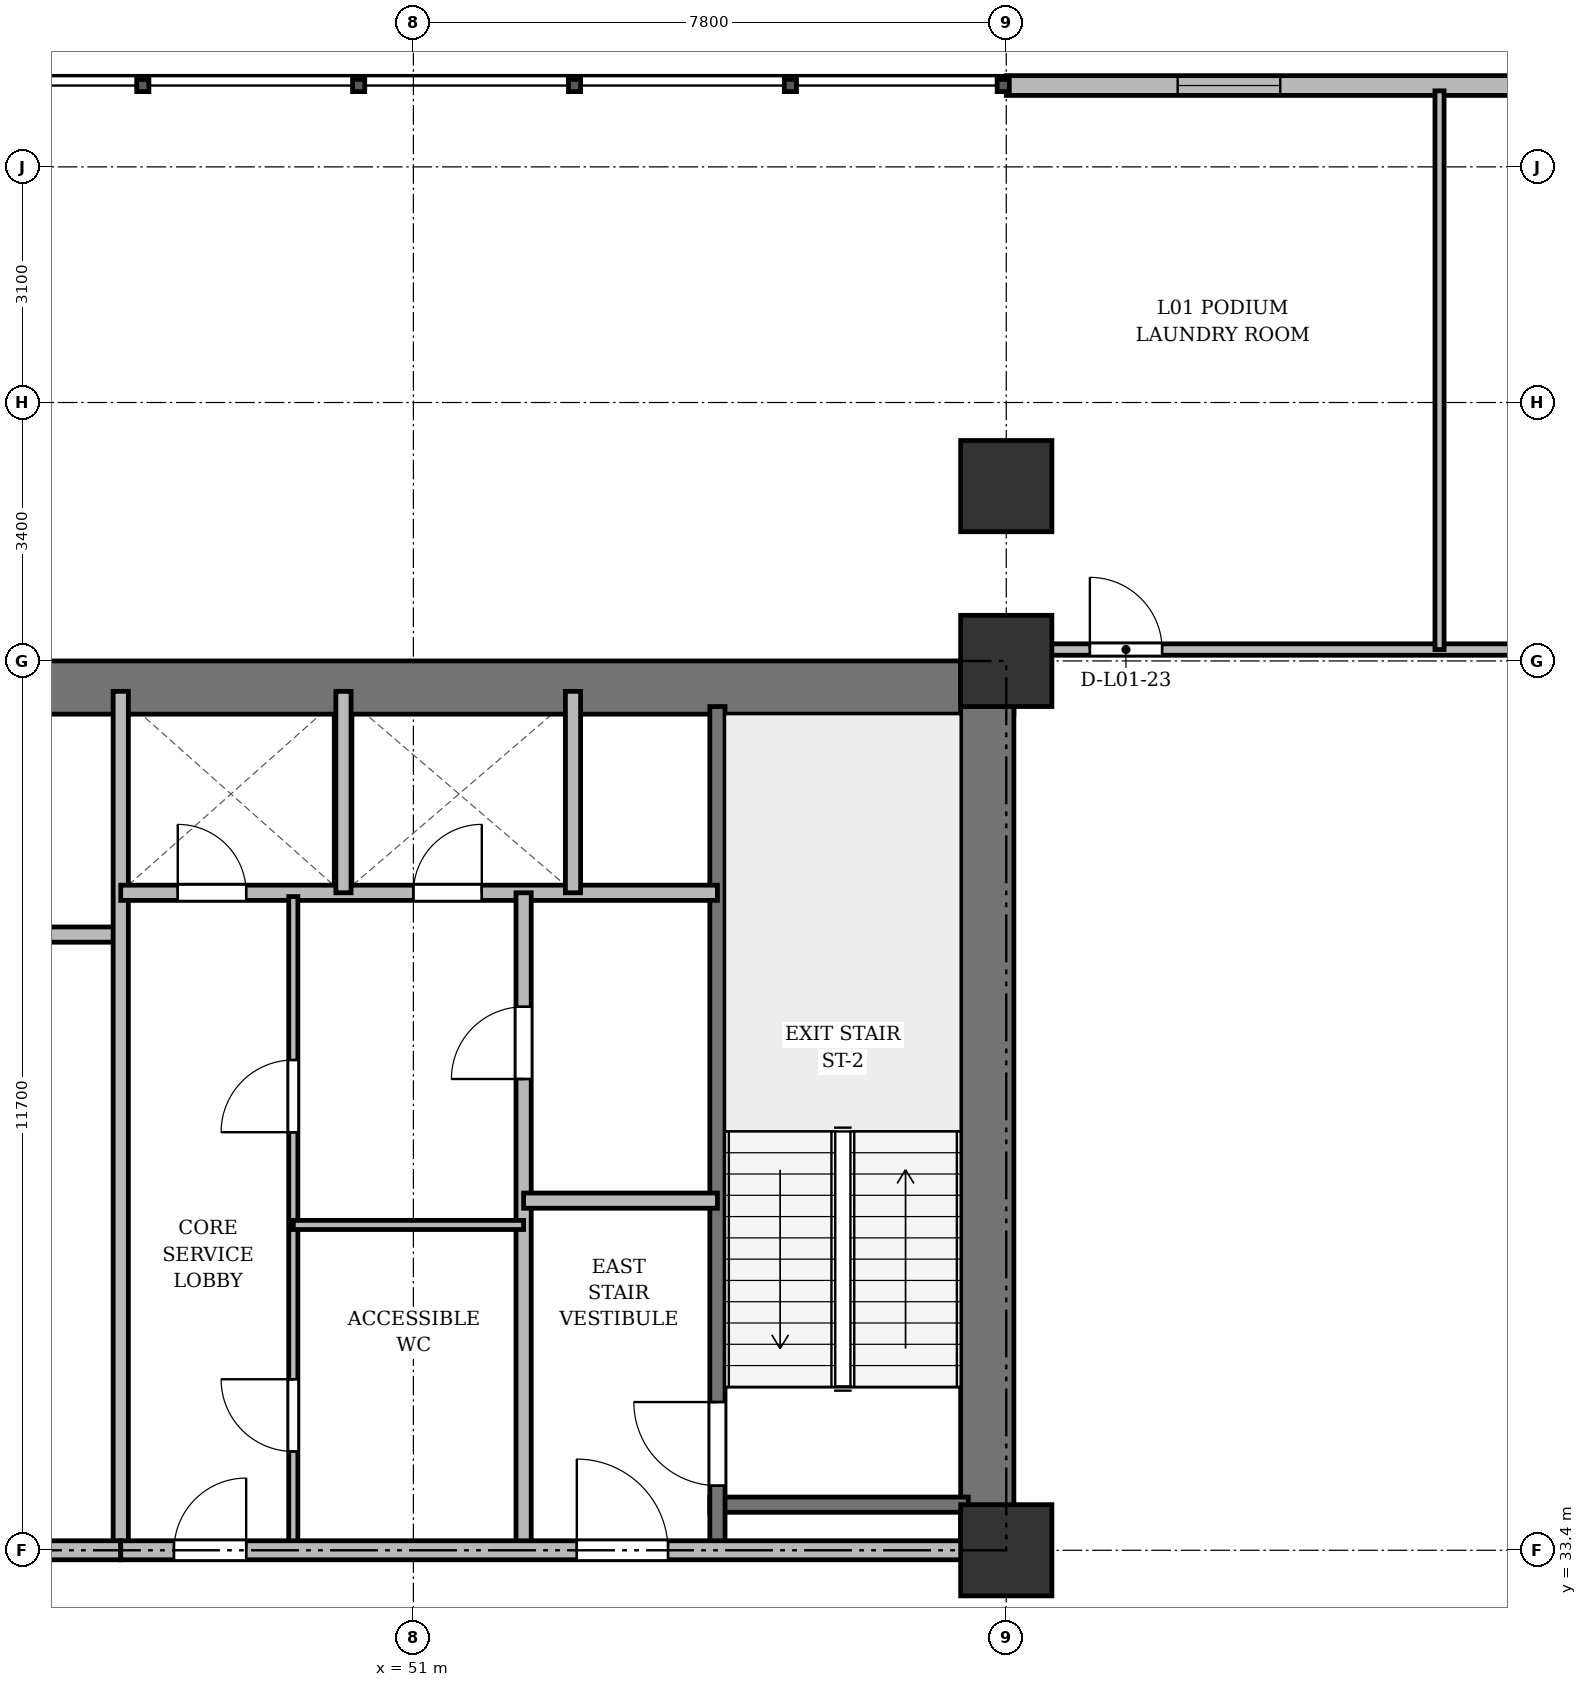
"""IFC4 building model, lengths in metres.
Left out: names, types, materials, properties, quantities, classifications, styles, units other than length and angle.
Written with IfcOpenShell. Run it as: python <this file> out.ifc"""

import sys

from ifc_helpers import new_model, si_unit, direction, frame, frame_2d, origin, origin_2d, place, context, subcontext, project, spatial, rectangle, extrude, source, transform, mapped, element, fill, save


model = new_model("IFC4")
c1 = context("Model", 3, precision=1e-05, world=origin(), true_north=direction((0.0, 1.0)))
c2 = subcontext(c1, "Body", "Model", "MODEL_VIEW")
j1 = project(units=[si_unit("LENGTHUNIT", "METRE"), si_unit("PLANEANGLEUNIT", "RADIAN")], contexts=[c1])
p1 = place(None, origin())
s1 = spatial("IfcSite", under=j1, at=p1, CompositionType="ELEMENT")
p2 = place(p1, origin())
s2 = spatial("IfcBuilding", under=s1, at=p2, CompositionType="ELEMENT")
p3 = place(p2, frame((0.0, 0.0, 5.2)))
s3 = spatial("IfcBuildingStorey", under=s2, at=p3, CompositionType="ELEMENT", Elevation=5.2)
m1 = source(origin(), c2, "Body", "SweptSolid", [
    extrude(rectangle(XDim=1.2, YDim=1.2, at=origin_2d()), origin(), (0.0, 0.0, 1.0), 4.5),
])
for number, where, z_axis, x_axis in (
    (1, (58.8, 33.4, 0.0), (0.0, 0.0, 1.0), (1.0, 0.0, 0.0)),
    (2, (58.8, 45.1, 0.0), (0.0, 0.0, 1.0), (1.0, 0.0, 0.0)),
    (3, (58.8, 47.4, 0.0), (0.0, 0.0, 1.0), (1.0, 0.0, 0.0)),
):
    element("IfcColumn", number, at=place(p3, frame(where, z_axis=z_axis, x_axis=x_axis)), inside=s3, PredefinedType="COLUMN", context=c2, shape_type="MappedRepresentation", body=[
        mapped(m1, transform((0.0, 0.0, 0.0), x_axis=(1.0, 0.0, 0.0), y_axis=(0.0, 1.0, 0.0), z_axis=(0.0, 0.0, 1.0), scale=1.0)),
    ])
p4 = place(p3, frame((58.8, 52.67, 0.0), z_axis=(0.0, 0.0, 1.0), x_axis=(1.0, 0.0, 0.0)))
e4 = element("IfcWall", 4, at=p4, inside=s3, PredefinedType="SOLIDWALL", context=c2, shape_type="SweptSolid", body=[
    extrude(rectangle(XDim=18.65, YDim=0.26, at=frame_2d((9.325, 0.0))), origin(), (0.0, 0.0, 1.0), 4.2),
])
p5 = place(p4, frame((2.255, 0.0, 0.9)))
e5 = element("IfcOpeningElement", 5, at=p5, cuts=e4, PredefinedType="OPENING", context=c2, shape_type="SweptSolid", body=[
    extrude(rectangle(XDim=1.35, YDim=1.5, at=frame_2d((0.675, 0.75))), frame((0.0, 0.14, 0.0), z_axis=(0.0, -1.0, 0.0), x_axis=(1.0, 0.0, 0.0)), (0.0, 0.0, 1.0), 0.28),
])
p6 = place(p4, frame((11.51, 0.0, 0.9)))
e6 = element("IfcOpeningElement", 6, at=p6, cuts=e4, PredefinedType="OPENING", context=c2, shape_type="SweptSolid", body=[
    extrude(rectangle(XDim=1.35, YDim=1.5, at=frame_2d((0.675, 0.75))), frame((0.0, 0.14, 0.0), z_axis=(0.0, -1.0, 0.0), x_axis=(1.0, 0.0, 0.0)), (0.0, 0.0, 1.0), 0.28),
])
p7 = place(p3, frame((15.5, 44.75, 0.0), z_axis=(0.0, 0.0, 1.0), x_axis=(1.0, 0.0, 0.0)))
e7 = element("IfcWall", 7, at=p7, inside=s3, PredefinedType="SHEAR", context=c2, shape_type="SweptSolid", body=[
    extrude(rectangle(XDim=43.4, YDim=0.7, at=frame_2d((21.7, 0.0))), origin(), (0.0, 0.0, 1.0), 4.2),
])
p8 = place(p3, frame((58.55, 33.4, 0.0), z_axis=(0.0, 0.0, 1.0), x_axis=(0.0, 1.0, 0.0)))
e8 = element("IfcWall", 8, at=p8, inside=s3, PredefinedType="SHEAR", context=c2, shape_type="SweptSolid", body=[
    extrude(rectangle(XDim=11.7, YDim=0.7, at=frame_2d((5.85, 0.0))), origin(), (0.0, 0.0, 1.0), 4.2),
])
p9 = place(p3, frame((54.9, 34.0, 0.0), z_axis=(0.0, 0.0, 1.0), x_axis=(1.0, 0.0, 0.0)))
e9 = element("IfcWall", 9, at=p9, inside=s3, PredefinedType="SHEAR", context=c2, shape_type="SweptSolid", body=[
    extrude(rectangle(XDim=3.4, YDim=0.2, at=frame_2d((1.7, 0.0))), origin(), (0.0, 0.0, 1.0), 4.2),
])
p10 = place(p3, frame((55.0, 33.4, 0.0), z_axis=(0.0, 0.0, 1.0), x_axis=(0.0, 1.0, 0.0)))
e10 = element("IfcWall", 10, at=p10, inside=s3, PredefinedType="SHEAR", context=c2, shape_type="SweptSolid", body=[
    extrude(rectangle(XDim=11.1, YDim=0.2, at=frame_2d((5.55, 0.0))), origin(), (0.0, 0.0, 1.0), 4.2),
])
p11 = place(p10, frame((0.85, 0.0, 0.0)))
e11 = element("IfcOpeningElement", 11, at=p11, cuts=e10, PredefinedType="OPENING", context=c2, shape_type="SweptSolid", body=[
    extrude(rectangle(XDim=1.1, YDim=2.15, at=frame_2d((0.55, 1.075))), frame((0.0, 0.11, 0.0), z_axis=(0.0, -1.0, 0.0), x_axis=(1.0, 0.0, 0.0)), (0.0, 0.0, 1.0), 0.22),
])
p12 = place(p3, frame((40.25, 41.5, 0.0), z_axis=(0.0, 0.0, 1.0), x_axis=(1.0, 0.0, 0.0)))
e12 = element("IfcWall", 12, at=p12, inside=s3, PredefinedType="SOLIDWALL", context=c2, shape_type="SweptSolid", body=[
    extrude(rectangle(XDim=6.9, YDim=0.2, at=frame_2d((3.45, 0.0))), origin(), (0.0, 0.0, 1.0), 3.4),
])
p13 = place(p3, frame((47.15, 33.4, 0.0), z_axis=(0.0, 0.0, 1.0), x_axis=(0.0, 1.0, 0.0)))
e13 = element("IfcWall", 13, at=p13, inside=s3, PredefinedType="SOLIDWALL", context=c2, shape_type="SweptSolid", body=[
    extrude(rectangle(XDim=11.3, YDim=0.2, at=frame_2d((5.65, 0.0))), origin(), (0.0, 0.0, 1.0), 3.1),
])
p14 = place(p3, frame((26.3, 33.4, 0.0), z_axis=(0.0, 0.0, 1.0), x_axis=(1.0, 0.0, 0.0)))
e14 = element("IfcWall", 14, at=p14, inside=s3, PredefinedType="PARTITIONING", context=c2, shape_type="SweptSolid", body=[
    extrude(rectangle(XDim=20.85, YDim=0.25, at=frame_2d((10.425, 0.0))), origin(), (0.0, 0.0, 1.0), 3.1),
])
p15 = place(p14, frame((9.2, 0.0, 0.0)))
e15 = element("IfcOpeningElement", 15, at=p15, cuts=e14, PredefinedType="OPENING", context=c2, shape_type="SweptSolid", body=[
    extrude(rectangle(XDim=1.6, YDim=2.2, at=frame_2d((0.8, 1.1))), frame((0.0, 0.135, 0.0), z_axis=(0.0, -1.0, 0.0), x_axis=(1.0, 0.0, 0.0)), (0.0, 0.0, 1.0), 0.27),
])
p16 = place(p3, frame((47.15, 42.05, 0.0), z_axis=(0.0, 0.0, 1.0), x_axis=(1.0, 0.0, 0.0)))
e16 = element("IfcWall", 16, at=p16, inside=s3, PredefinedType="SOLIDWALL", context=c2, shape_type="SweptSolid", body=[
    extrude(rectangle(XDim=7.85, YDim=0.2, at=frame_2d((3.925, 0.0))), origin(), (0.0, 0.0, 1.0), 4.2),
])
p17 = place(p16, frame((0.75, 0.0, 0.0)))
e17 = element("IfcOpeningElement", 17, at=p17, cuts=e16, PredefinedType="OPENING", context=c2, shape_type="SweptSolid", body=[
    extrude(rectangle(XDim=0.9, YDim=2.1, at=frame_2d((0.45, 1.05))), frame((0.0, 0.11, 0.0), z_axis=(0.0, -1.0, 0.0), x_axis=(1.0, 0.0, 0.0)), (0.0, 0.0, 1.0), 0.22),
])
p18 = place(p16, frame((3.85, 0.0, 0.0)))
e18 = element("IfcOpeningElement", 18, at=p18, cuts=e16, PredefinedType="OPENING", context=c2, shape_type="SweptSolid", body=[
    extrude(rectangle(XDim=0.9, YDim=2.1, at=frame_2d((0.45, 1.05))), frame((0.0, 0.11, 0.0), z_axis=(0.0, -1.0, 0.0), x_axis=(1.0, 0.0, 0.0)), (0.0, 0.0, 1.0), 0.22),
])
for number, where, z_axis, x_axis in (
    (19, (50.08, 42.05, 0.0), (0.0, 0.0, 1.0), (0.0, 1.0, 0.0)),
    (20, (53.1, 42.05, 0.0), (0.0, 0.0, 1.0), (0.0, 1.0, 0.0)),
):
    element("IfcWall", number, at=place(p3, frame(where, z_axis=z_axis, x_axis=x_axis)), inside=s3, PredefinedType="SOLIDWALL", context=c2, shape_type="SweptSolid", body=[
        extrude(rectangle(XDim=2.65, YDim=0.2, at=frame_2d((1.325, 0.0))), origin(), (0.0, 0.0, 1.0), 4.2),
    ])
p19 = place(p3, frame((52.45, 33.4, 0.0), z_axis=(0.0, 0.0, 1.0), x_axis=(0.0, 1.0, 0.0)))
e21 = element("IfcWall", 21, at=p19, inside=s3, PredefinedType="PARTITIONING", context=c2, shape_type="SweptSolid", body=[
    extrude(rectangle(XDim=8.65, YDim=0.2, at=frame_2d((4.325, 0.0))), origin(), (0.0, 0.0, 1.0), 3.1),
])
p20 = place(p19, frame((6.2, 0.0, 0.0)))
e22 = element("IfcOpeningElement", 22, at=p20, cuts=e21, PredefinedType="OPENING", context=c2, shape_type="SweptSolid", body=[
    extrude(rectangle(XDim=0.95, YDim=2.15, at=frame_2d((0.475, 1.075))), frame((0.0, 0.11, 0.0), z_axis=(0.0, -1.0, 0.0), x_axis=(1.0, 0.0, 0.0)), (0.0, 0.0, 1.0), 0.22),
])
p21 = place(p3, frame((52.45, 38.0, 0.0), z_axis=(0.0, 0.0, 1.0), x_axis=(1.0, 0.0, 0.0)))
e23 = element("IfcWall", 23, at=p21, inside=s3, PredefinedType="PARTITIONING", context=c2, shape_type="SweptSolid", body=[
    extrude(rectangle(XDim=2.55, YDim=0.2, at=frame_2d((1.275, 0.0))), origin(), (0.0, 0.0, 1.0), 4.2),
])
p22 = place(p3, frame((49.42, 33.4, 0.0), z_axis=(0.0, 0.0, 1.0), x_axis=(0.0, 1.0, 0.0)))
e24 = element("IfcWall", 24, at=p22, inside=s3, PredefinedType="PARTITIONING", context=c2, shape_type="SweptSolid", body=[
    extrude(rectangle(XDim=8.6, YDim=0.12, at=frame_2d((4.3, 0.0))), origin(), (0.0, 0.0, 1.0), 3.1),
])
p23 = place(p22, frame((1.3, 0.0, 0.0)))
e25 = element("IfcOpeningElement", 25, at=p23, cuts=e24, PredefinedType="OPENING", context=c2, shape_type="SweptSolid", body=[
    extrude(rectangle(XDim=0.95, YDim=2.15, at=frame_2d((0.475, 1.075))), frame((0.0, 0.07, 0.0), z_axis=(0.0, -1.0, 0.0), x_axis=(1.0, 0.0, 0.0)), (0.0, 0.0, 1.0), 0.14),
])
p24 = place(p22, frame((5.5, 0.0, 0.0)))
e26 = element("IfcOpeningElement", 26, at=p24, cuts=e24, PredefinedType="OPENING", context=c2, shape_type="SweptSolid", body=[
    extrude(rectangle(XDim=0.95, YDim=2.15, at=frame_2d((0.475, 1.075))), frame((0.0, 0.07, 0.0), z_axis=(0.0, -1.0, 0.0), x_axis=(1.0, 0.0, 0.0)), (0.0, 0.0, 1.0), 0.14),
])
p25 = place(p3, frame((49.42, 37.68, 0.0), z_axis=(0.0, 0.0, 1.0), x_axis=(1.0, 0.0, 0.0)))
e27 = element("IfcWall", 27, at=p25, inside=s3, PredefinedType="PARTITIONING", context=c2, shape_type="SweptSolid", body=[
    extrude(rectangle(XDim=3.03, YDim=0.12, at=frame_2d((1.515, 0.0))), origin(), (0.0, 0.0, 1.0), 4.2),
])
p26 = place(p3, frame((47.15, 33.4, 0.0), z_axis=(0.0, 0.0, 1.0), x_axis=(1.0, 0.0, 0.0)))
e28 = element("IfcWall", 28, at=p26, inside=s3, PredefinedType="PARTITIONING", context=c2, shape_type="SweptSolid", body=[
    extrude(rectangle(XDim=11.15, YDim=0.25, at=frame_2d((5.575, 0.0))), origin(), (0.0, 0.0, 1.0), 3.1),
])
p27 = place(p26, frame((0.7, 0.0, 0.0)))
e29 = element("IfcOpeningElement", 29, at=p27, cuts=e28, PredefinedType="OPENING", context=c2, shape_type="SweptSolid", body=[
    extrude(rectangle(XDim=0.95, YDim=2.15, at=frame_2d((0.475, 1.075))), frame((0.0, 0.135, 0.0), z_axis=(0.0, -1.0, 0.0), x_axis=(1.0, 0.0, 0.0)), (0.0, 0.0, 1.0), 0.27),
])
p28 = place(p26, frame((6.0, 0.0, 0.0)))
e30 = element("IfcOpeningElement", 30, at=p28, cuts=e28, PredefinedType="OPENING", context=c2, shape_type="SweptSolid", body=[
    extrude(rectangle(XDim=1.2, YDim=2.15, at=frame_2d((0.6, 1.075))), frame((0.0, 0.135, 0.0), z_axis=(0.0, -1.0, 0.0), x_axis=(1.0, 0.0, 0.0)), (0.0, 0.0, 1.0), 0.27),
])
p29 = place(p3, frame((58.6, 45.25, 0.0), z_axis=(0.0, 0.0, 1.0), x_axis=(1.0, 0.0, 0.0)))
e31 = element("IfcWall", 31, at=p29, inside=s3, PredefinedType="PARTITIONING", context=c2, shape_type="SweptSolid", body=[
    extrude(rectangle(XDim=18.75, YDim=0.15, at=frame_2d((9.375, 0.0))), origin(), (0.0, 0.0, 1.0), 3.1),
])
p30 = place(p29, frame((1.3, 0.0, 0.0)))
e32 = element("IfcOpeningElement", 32, at=p30, cuts=e31, PredefinedType="OPENING", context=c2, shape_type="SweptSolid", body=[
    extrude(rectangle(XDim=0.95, YDim=2.15, at=frame_2d((0.475, 1.075))), frame((0.0, 0.085, 0.0), z_axis=(0.0, -1.0, 0.0), x_axis=(1.0, 0.0, 0.0)), (0.0, 0.0, 1.0), 0.17),
])
p31 = place(p29, frame((7.0, 0.0, 0.0)))
e33 = element("IfcOpeningElement", 33, at=p31, cuts=e31, PredefinedType="OPENING", context=c2, shape_type="SweptSolid", body=[
    extrude(rectangle(XDim=0.95, YDim=2.15, at=frame_2d((0.475, 1.075))), frame((0.0, 0.085, 0.0), z_axis=(0.0, -1.0, 0.0), x_axis=(1.0, 0.0, 0.0)), (0.0, 0.0, 1.0), 0.17),
])
p32 = place(p3, frame((64.5, 45.25, 0.0), z_axis=(0.0, 0.0, 1.0), x_axis=(0.0, 1.0, 0.0)))
e34 = element("IfcWall", 34, at=p32, inside=s3, PredefinedType="PARTITIONING", context=c2, shape_type="SweptSolid", body=[
    extrude(rectangle(XDim=7.35, YDim=0.12, at=frame_2d((3.675, 0.0))), origin(), (0.0, 0.0, 1.0), 3.1),
])
m2 = source(origin(), c2, "Body", "SweptSolid", [
    extrude(rectangle(XDim=1.35, YDim=1.5, at=frame_2d((0.675, 0.75))), frame((0.0, 0.03, 0.0), z_axis=(0.0, -1.0, 0.0), x_axis=(1.0, 0.0, 0.0)), (0.0, 0.0, 1.0), 0.06),
])
p33 = place(p5, origin())
e35 = element("IfcWindow", 35, at=p33, inside=s3, PartitioningType="SINGLE_PANEL", PredefinedType="WINDOW", context=c2, shape_type="MappedRepresentation", body=[
    mapped(m2, transform((0.0, 0.0, 0.0), x_axis=(1.0, 0.0, 0.0), y_axis=(0.0, 1.0, 0.0), z_axis=(0.0, 0.0, 1.0), scale=1.0)),
])
fill(e5, e35)
m3 = source(origin(), c2, "Body", "SweptSolid", [
    extrude(rectangle(XDim=1.1, YDim=2.15, at=frame_2d((0.55, 1.075))), frame((0.0, 0.025, 0.0), z_axis=(0.0, -1.0, 0.0), x_axis=(1.0, 0.0, 0.0)), (0.0, 0.0, 1.0), 0.05),
])
p34 = place(p11, origin())
e36 = element("IfcDoor", 36, at=p34, inside=s3, OperationType="SINGLE_SWING_RIGHT", PredefinedType="DOOR", context=c2, shape_type="MappedRepresentation", body=[
    mapped(m3, transform((0.0, 0.0, 0.0), x_axis=(1.0, 0.0, 0.0), y_axis=(0.0, 1.0, 0.0), z_axis=(0.0, 0.0, 1.0), scale=1.0)),
])
fill(e11, e36)
m4 = source(origin(), c2, "Body", "SweptSolid", [
    extrude(rectangle(XDim=0.9, YDim=2.1, at=frame_2d((0.45, 1.05))), frame((0.0, 0.025, 0.0), z_axis=(0.0, -1.0, 0.0), x_axis=(1.0, 0.0, 0.0)), (0.0, 0.0, 1.0), 0.05),
])
p35 = place(p17, origin())
e37 = element("IfcDoor", 37, at=p35, inside=s3, OperationType="SINGLE_SWING_LEFT", PredefinedType="DOOR", context=c2, shape_type="MappedRepresentation", body=[
    mapped(m4, transform((0.0, 0.0, 0.0), x_axis=(1.0, 0.0, 0.0), y_axis=(0.0, 1.0, 0.0), z_axis=(0.0, 0.0, 1.0), scale=1.0)),
])
fill(e17, e37)
p36 = place(p18, origin())
e38 = element("IfcDoor", 38, at=p36, inside=s3, OperationType="SINGLE_SWING_RIGHT", PredefinedType="DOOR", context=c2, shape_type="MappedRepresentation", body=[
    mapped(m4, transform((0.0, 0.0, 0.0), x_axis=(1.0, 0.0, 0.0), y_axis=(0.0, 1.0, 0.0), z_axis=(0.0, 0.0, 1.0), scale=1.0)),
])
fill(e18, e38)
m5 = source(origin(), c2, "Body", "SweptSolid", [
    extrude(rectangle(XDim=0.95, YDim=2.15, at=frame_2d((0.475, 1.075))), frame((0.0, 0.025, 0.0), z_axis=(0.0, -1.0, 0.0), x_axis=(1.0, 0.0, 0.0)), (0.0, 0.0, 1.0), 0.05),
])
p37 = place(p20, origin())
e39 = element("IfcDoor", 39, at=p37, inside=s3, OperationType="SINGLE_SWING_LEFT", PredefinedType="DOOR", context=c2, shape_type="MappedRepresentation", body=[
    mapped(m5, transform((0.0, 0.0, 0.0), x_axis=(1.0, 0.0, 0.0), y_axis=(0.0, 1.0, 0.0), z_axis=(0.0, 0.0, 1.0), scale=1.0)),
])
fill(e22, e39)
p38 = place(p23, origin())
e40 = element("IfcDoor", 40, at=p38, inside=s3, OperationType="SINGLE_SWING_RIGHT", PredefinedType="DOOR", context=c2, shape_type="MappedRepresentation", body=[
    mapped(m5, transform((0.0, 0.0, 0.0), x_axis=(1.0, 0.0, 0.0), y_axis=(0.0, 1.0, 0.0), z_axis=(0.0, 0.0, 1.0), scale=1.0)),
])
fill(e25, e40)
p39 = place(p24, origin())
e41 = element("IfcDoor", 41, at=p39, inside=s3, OperationType="SINGLE_SWING_LEFT", PredefinedType="DOOR", context=c2, shape_type="MappedRepresentation", body=[
    mapped(m5, transform((0.0, 0.0, 0.0), x_axis=(1.0, 0.0, 0.0), y_axis=(0.0, 1.0, 0.0), z_axis=(0.0, 0.0, 1.0), scale=1.0)),
])
fill(e26, e41)
p40 = place(p27, origin())
e42 = element("IfcDoor", 42, at=p40, inside=s3, OperationType="SINGLE_SWING_RIGHT", PredefinedType="DOOR", context=c2, shape_type="MappedRepresentation", body=[
    mapped(m5, transform((0.0, 0.0, 0.0), x_axis=(1.0, 0.0, 0.0), y_axis=(0.0, 1.0, 0.0), z_axis=(0.0, 0.0, 1.0), scale=1.0)),
])
fill(e29, e42)
m6 = source(origin(), c2, "Body", "SweptSolid", [
    extrude(rectangle(XDim=1.2, YDim=2.15, at=frame_2d((0.6, 1.075))), frame((0.0, 0.025, 0.0), z_axis=(0.0, -1.0, 0.0), x_axis=(1.0, 0.0, 0.0)), (0.0, 0.0, 1.0), 0.05),
])
p41 = place(p28, origin())
e43 = element("IfcDoor", 43, at=p41, inside=s3, OperationType="SINGLE_SWING_LEFT", PredefinedType="DOOR", context=c2, shape_type="MappedRepresentation", body=[
    mapped(m6, transform((0.0, 0.0, 0.0), x_axis=(1.0, 0.0, 0.0), y_axis=(0.0, 1.0, 0.0), z_axis=(0.0, 0.0, 1.0), scale=1.0)),
])
fill(e30, e43)
p42 = place(p30, origin())
e44 = element("IfcDoor", 44, at=p42, inside=s3, OperationType="SINGLE_SWING_LEFT", PredefinedType="DOOR", context=c2, shape_type="MappedRepresentation", body=[
    mapped(m5, transform((0.0, 0.0, 0.0), x_axis=(1.0, 0.0, 0.0), y_axis=(0.0, 1.0, 0.0), z_axis=(0.0, 0.0, 1.0), scale=1.0)),
])
fill(e32, e44)
save(model, sys.argv[1])
